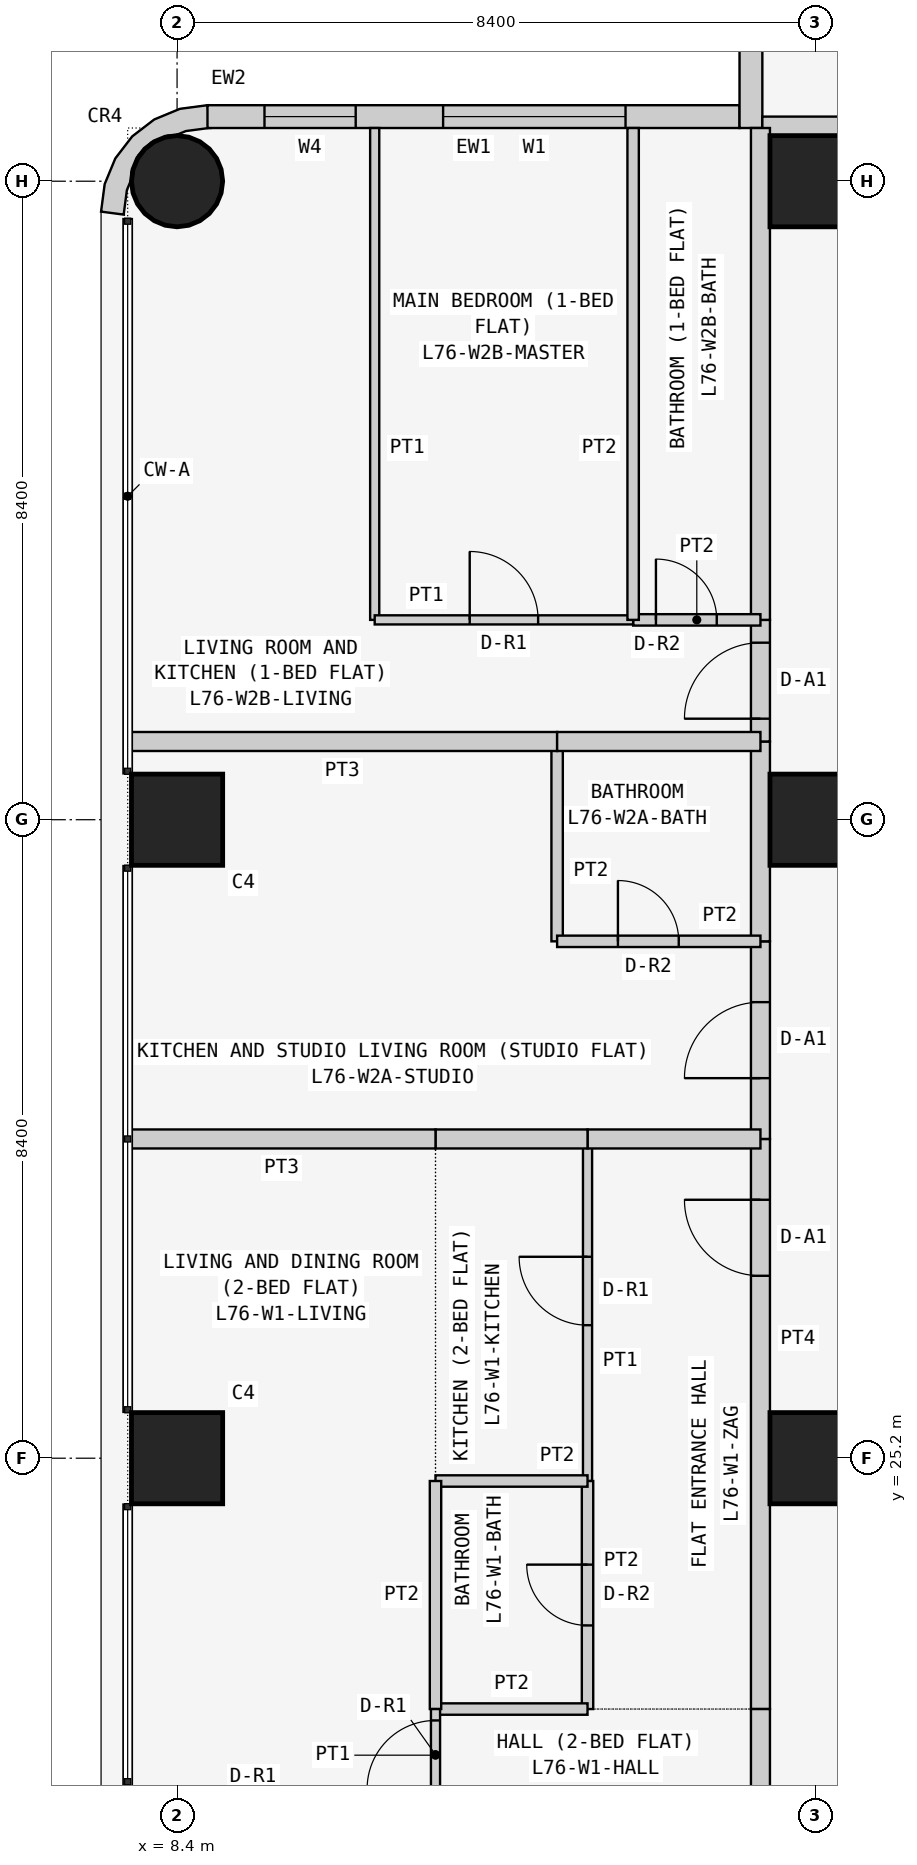
"""IFC4 building model, lengths in metres.
Left out: names, types, materials, properties, quantities, classifications, styles, units other than length and angle.
Written with IfcOpenShell. Run it as: python <this file> out.ifc"""

import sys

from ifc_helpers import new_model, si_unit, direction, frame, frame_2d, origin, origin_2d, place, context, subcontext, project, spatial, polyline, rectangle, circle, outline, extrude, element, fill, save


model = new_model("IFC4")
c1 = context("Model", 3, precision=1e-05, world=origin(), true_north=direction((0.0, 1.0)))
c2 = subcontext(c1, "Body", "Model", "MODEL_VIEW")
j1 = project(units=[si_unit("LENGTHUNIT", "METRE"), si_unit("PLANEANGLEUNIT", "RADIAN")], contexts=[c1])
p1 = place(None, origin())
s1 = spatial("IfcSite", under=j1, at=p1, CompositionType="ELEMENT")
p2 = place(p1, origin())
s2 = spatial("IfcBuilding", under=s1, at=p2, CompositionType="ELEMENT")
p3 = place(p2, frame((0.0, 0.0, 290.1)))
s3 = spatial("IfcBuildingStorey", under=s2, at=p3, CompositionType="ELEMENT", Elevation=290.1)
for number, where, z_axis, x_axis in (
    (1, (8.4, 25.2, 0.0), (0.0, 0.0, 1.0), (1.0, 0.0, 0.0)),
    (2, (8.4, 33.6, 0.0), (0.0, 0.0, 1.0), (1.0, 0.0, 0.0)),
):
    element("IfcColumn", number, at=place(p3, frame(where, z_axis=z_axis, x_axis=x_axis)), inside=s3, PredefinedType="COLUMN", context=c2, shape_type="SweptSolid", body=[
        extrude(rectangle(XDim=1.2, YDim=1.2, at=origin_2d()), origin(), (0.0, 0.0, 1.0), 3.6),
    ])
p4 = place(p3, frame((8.4, 42.0, 0.0), z_axis=(0.0, 0.0, 1.0), x_axis=(1.0, 0.0, 0.0)))
e3 = element("IfcColumn", 3, at=p4, inside=s3, PredefinedType="COLUMN", context=c2, shape_type="SweptSolid", body=[
    extrude(circle(Radius=0.6, at=origin_2d()), origin(), (0.0, 0.0, 1.0), 3.6),
])
for number, where, z_axis, x_axis in (
    (4, (16.8, 25.2, 0.0), (0.0, 0.0, 1.0), (1.0, 0.0, 0.0)),
    (5, (16.8, 33.6, 0.0), (0.0, 0.0, 1.0), (1.0, 0.0, 0.0)),
    (6, (16.8, 42.0, 0.0), (0.0, 0.0, 1.0), (1.0, 0.0, 0.0)),
):
    element("IfcColumn", number, at=place(p3, frame(where, z_axis=z_axis, x_axis=x_axis)), inside=s3, PredefinedType="COLUMN", context=c2, shape_type="SweptSolid", body=[
        extrude(rectangle(XDim=1.2, YDim=1.2, at=origin_2d()), origin(), (0.0, 0.0, 1.0), 3.6),
    ])
p5 = place(p3, frame((15.8, 42.85, 0.0), z_axis=(0.0, 0.0, 1.0), x_axis=(-1.0, 0.0, 0.0)))
e7 = element("IfcWall", 7, at=p5, inside=s3, PredefinedType="SOLIDWALL", context=c2, shape_type="SweptSolid", body=[
    extrude(rectangle(XDim=7.0, YDim=0.3, at=frame_2d((3.5, 0.0))), origin(), (0.0, 0.0, 1.0), 3.45),
])
p6 = place(p5, frame((1.5, 0.0, 0.9)))
e8 = element("IfcOpeningElement", 8, at=p6, cuts=e7, PredefinedType="OPENING", context=c2, shape_type="SweptSolid", body=[
    extrude(rectangle(XDim=2.4, YDim=1.5, at=frame_2d((1.2, 0.75))), frame((0.0, 0.16, 0.0), z_axis=(0.0, -1.0, 0.0), x_axis=(1.0, 0.0, 0.0)), (0.0, 0.0, 1.0), 0.32),
])
p7 = place(p5, frame((5.05, 0.0, 0.9)))
e9 = element("IfcOpeningElement", 9, at=p7, cuts=e7, PredefinedType="OPENING", context=c2, shape_type="SweptSolid", body=[
    extrude(rectangle(XDim=1.2, YDim=1.5, at=frame_2d((0.6, 0.75))), frame((0.0, 0.16, 0.0), z_axis=(0.0, -1.0, 0.0), x_axis=(1.0, 0.0, 0.0)), (0.0, 0.0, 1.0), 0.32),
])
p8 = place(p3, frame((15.95, 50.0, 0.0), z_axis=(0.0, 0.0, 1.0), x_axis=(0.0, -1.0, 0.0)))
e10 = element("IfcWall", 10, at=p8, inside=s3, PredefinedType="SOLIDWALL", context=c2, shape_type="SweptSolid", body=[
    extrude(rectangle(XDim=7.3, YDim=0.3, at=frame_2d((3.65, 0.0))), origin(), (0.0, 0.0, 1.0), 3.45),
])
p9 = place(p8, frame((3.1, 0.0, 0.9)))
e11 = element("IfcOpeningElement", 11, at=p9, cuts=e10, PredefinedType="OPENING", context=c2, shape_type="SweptSolid", body=[
    extrude(rectangle(XDim=2.4, YDim=1.5, at=frame_2d((1.2, 0.75))), frame((0.0, 0.16, 0.0), z_axis=(0.0, -1.0, 0.0), x_axis=(1.0, 0.0, 0.0)), (0.0, 0.0, 1.0), 0.32),
])
p10 = place(p8, frame((0.75, 0.0, 0.9)))
e12 = element("IfcOpeningElement", 12, at=p10, cuts=e10, PredefinedType="OPENING", context=c2, shape_type="SweptSolid", body=[
    extrude(rectangle(XDim=1.2, YDim=1.5, at=frame_2d((0.6, 0.75))), frame((0.0, 0.16, 0.0), z_axis=(0.0, -1.0, 0.0), x_axis=(1.0, 0.0, 0.0)), (0.0, 0.0, 1.0), 0.32),
])
p11 = place(p3, frame((8.762, 42.576, 0.0), z_axis=(0.0, 0.0, 1.0), x_axis=(-0.707106781187, 0.707106781187, 0.0)))
e13 = element("IfcWall", 13, at=p11, inside=s3, PredefinedType="SOLIDWALL", context=c2, shape_type="SweptSolid", body=[
    extrude(outline(polyline([(0.233, 0.114), (0.047, -0.129), (0.033, -0.143), (0.273, -0.327), (0.495, -0.037), (0.635, 0.3), (0.683, 0.663), (0.635, 1.025), (0.495, 1.363), (0.273, 1.653), (0.033, 1.469), (0.047, 1.455), (0.233, 1.212), (0.292, 1.069), (0.358, 1.003), (0.449, 0.783), (0.449, 0.543), (0.358, 0.322), (0.292, 0.257), (0.233, 0.114)])), origin(), (0.0, 0.0, 1.0), 3.45),
])
p12 = place(p3, frame((16.1, 42.725, 0.0), z_axis=(0.0, 0.0, 1.0), x_axis=(1.0, 0.0, 0.0)))
e14 = element("IfcWall", 14, at=p12, inside=s3, PredefinedType="PARTITIONING", context=c2, shape_type="SweptSolid", body=[
    extrude(rectangle(XDim=6.871, YDim=0.25, at=frame_2d((3.436, 0.0))), origin(), (0.0, 0.0, 1.0), 3.45),
])
p13 = place(p3, frame((16.075, 21.9, 0.0), z_axis=(0.0, 0.0, 1.0), x_axis=(0.0, 1.0, 0.0)))
e15 = element("IfcWall", 15, at=p13, inside=s3, PredefinedType="PARTITIONING", context=c2, shape_type="SweptSolid", body=[
    extrude(rectangle(XDim=7.5, YDim=0.25, at=frame_2d((3.75, 0.0))), origin(), (0.0, 0.0, 1.0), 3.45),
])
p14 = place(p13, frame((5.7, 0.0, 0.0)))
e16 = element("IfcOpeningElement", 16, at=p14, cuts=e15, PredefinedType="OPENING", context=c2, shape_type="SweptSolid", body=[
    extrude(rectangle(XDim=1.0, YDim=2.1, at=frame_2d((0.5, 1.05))), frame((0.0, 0.135, 0.0), z_axis=(0.0, -1.0, 0.0), x_axis=(1.0, 0.0, 0.0)), (0.0, 0.0, 1.0), 0.27),
])
p15 = place(p3, frame((16.075, 20.686, 0.0), z_axis=(0.0, 0.0, 1.0), x_axis=(0.0, 1.0, 0.0)))
e17 = element("IfcWall", 17, at=p15, inside=s3, PredefinedType="PARTITIONING", context=c2, shape_type="SweptSolid", body=[
    extrude(rectangle(XDim=1.214, YDim=0.25, at=frame_2d((0.607, 0.0))), origin(), (0.0, 0.0, 1.0), 3.45),
])
p16 = place(p3, frame((16.075, 29.4, 0.0), z_axis=(0.0, 0.0, 1.0), x_axis=(0.0, 1.0, 0.0)))
e18 = element("IfcWall", 18, at=p16, inside=s3, PredefinedType="PARTITIONING", context=c2, shape_type="SweptSolid", body=[
    extrude(rectangle(XDim=2.6, YDim=0.25, at=frame_2d((1.3, 0.0))), origin(), (0.0, 0.0, 1.0), 3.45),
])
p17 = place(p16, frame((0.8, 0.0, 0.0)))
e19 = element("IfcOpeningElement", 19, at=p17, cuts=e18, PredefinedType="OPENING", context=c2, shape_type="SweptSolid", body=[
    extrude(rectangle(XDim=1.0, YDim=2.1, at=frame_2d((0.5, 1.05))), frame((0.0, 0.135, 0.0), z_axis=(0.0, -1.0, 0.0), x_axis=(1.0, 0.0, 0.0)), (0.0, 0.0, 1.0), 0.27),
])
p18 = place(p3, frame((16.075, 32.0, 0.0), z_axis=(0.0, 0.0, 1.0), x_axis=(0.0, 1.0, 0.0)))
e20 = element("IfcWall", 20, at=p18, inside=s3, PredefinedType="PARTITIONING", context=c2, shape_type="SweptSolid", body=[
    extrude(rectangle(XDim=2.629, YDim=0.25, at=frame_2d((1.314, 0.0))), origin(), (0.0, 0.0, 1.0), 3.45),
])
p19 = place(p3, frame((16.075, 34.629, 0.0), z_axis=(0.0, 0.0, 1.0), x_axis=(0.0, 1.0, 0.0)))
e21 = element("IfcWall", 21, at=p19, inside=s3, PredefinedType="PARTITIONING", context=c2, shape_type="SweptSolid", body=[
    extrude(rectangle(XDim=1.6, YDim=0.25, at=frame_2d((0.8, 0.0))), origin(), (0.0, 0.0, 1.0), 3.45),
])
p20 = place(p19, frame((0.3, 0.0, 0.0)))
e22 = element("IfcOpeningElement", 22, at=p20, cuts=e21, PredefinedType="OPENING", context=c2, shape_type="SweptSolid", body=[
    extrude(rectangle(XDim=1.0, YDim=2.1, at=frame_2d((0.5, 1.05))), frame((0.0, 0.135, 0.0), z_axis=(0.0, -1.0, 0.0), x_axis=(1.0, 0.0, 0.0)), (0.0, 0.0, 1.0), 0.27),
])
p21 = place(p3, frame((16.075, 36.229, 0.0), z_axis=(0.0, 0.0, 1.0), x_axis=(0.0, 1.0, 0.0)))
e23 = element("IfcWall", 23, at=p21, inside=s3, PredefinedType="PARTITIONING", context=c2, shape_type="SweptSolid", body=[
    extrude(rectangle(XDim=6.471, YDim=0.25, at=frame_2d((3.235, 0.0))), origin(), (0.0, 0.0, 1.0), 3.45),
])
p22 = place(p3, frame((13.8, 29.4, 0.0), z_axis=(0.0, 0.0, 1.0), x_axis=(0.0, -1.0, 0.0)))
e24 = element("IfcWall", 24, at=p22, inside=s3, PredefinedType="PARTITIONING", context=c2, shape_type="SweptSolid", body=[
    extrude(rectangle(XDim=4.5, YDim=0.12, at=frame_2d((2.25, 0.0))), origin(), (0.0, 0.0, 1.0), 3.45),
])
p23 = place(p22, frame((1.55, 0.0, 0.0)))
e25 = element("IfcOpeningElement", 25, at=p23, cuts=e24, PredefinedType="OPENING", context=c2, shape_type="SweptSolid", body=[
    extrude(rectangle(XDim=0.9, YDim=2.1, at=frame_2d((0.45, 1.05))), frame((0.0, 0.07, 0.0), z_axis=(0.0, -1.0, 0.0), x_axis=(1.0, 0.0, 0.0)), (0.0, 0.0, 1.0), 0.14),
])
p24 = place(p3, frame((13.8, 24.9, 0.0), z_axis=(0.0, 0.0, 1.0), x_axis=(0.0, -1.0, 0.0)))
e26 = element("IfcWall", 26, at=p24, inside=s3, PredefinedType="PARTITIONING", context=c2, shape_type="SweptSolid", body=[
    extrude(rectangle(XDim=3.0, YDim=0.15, at=frame_2d((1.5, 0.0))), origin(), (0.0, 0.0, 1.0), 3.45),
])
p25 = place(p24, frame((1.1, 0.0, 0.0)))
e27 = element("IfcOpeningElement", 27, at=p25, cuts=e26, PredefinedType="OPENING", context=c2, shape_type="SweptSolid", body=[
    extrude(rectangle(XDim=0.8, YDim=2.1, at=frame_2d((0.4, 1.05))), frame((0.0, 0.085, 0.0), z_axis=(0.0, -1.0, 0.0), x_axis=(1.0, 0.0, 0.0)), (0.0, 0.0, 1.0), 0.17),
])
p26 = place(p3, frame((16.075, 29.4, 0.0), z_axis=(0.0, 0.0, 1.0), x_axis=(-1.0, 0.0, 0.0)))
e28 = element("IfcWall", 28, at=p26, inside=s3, PredefinedType="PARTITIONING", context=c2, shape_type="SweptSolid", body=[
    extrude(rectangle(XDim=2.275, YDim=0.25, at=frame_2d((1.137, 0.0))), origin(), (0.0, 0.0, 1.0), 3.45),
])
p27 = place(p3, frame((11.8, 24.9, 0.0), z_axis=(0.0, 0.0, 1.0), x_axis=(1.0, 0.0, 0.0)))
e29 = element("IfcWall", 29, at=p27, inside=s3, PredefinedType="PARTITIONING", context=c2, shape_type="SweptSolid", body=[
    extrude(rectangle(XDim=2.0, YDim=0.15, at=frame_2d((1.0, 0.0))), origin(), (0.0, 0.0, 1.0), 3.45),
])
p28 = place(p3, frame((13.8, 29.4, 0.0), z_axis=(0.0, 0.0, 1.0), x_axis=(-1.0, 0.0, 0.0)))
e30 = element("IfcWall", 30, at=p28, inside=s3, PredefinedType="PARTITIONING", context=c2, shape_type="SweptSolid", body=[
    extrude(rectangle(XDim=2.0, YDim=0.25, at=frame_2d((1.0, 0.0))), origin(), (0.0, 0.0, 1.0), 3.45),
])
p29 = place(p3, frame((11.8, 21.9, 0.0), z_axis=(0.0, 0.0, 1.0), x_axis=(1.0, 0.0, 0.0)))
e31 = element("IfcWall", 31, at=p29, inside=s3, PredefinedType="PARTITIONING", context=c2, shape_type="SweptSolid", body=[
    extrude(rectangle(XDim=2.0, YDim=0.15, at=frame_2d((1.0, 0.0))), origin(), (0.0, 0.0, 1.0), 3.45),
])
p30 = place(p3, frame((11.8, 24.9, 0.0), z_axis=(0.0, 0.0, 1.0), x_axis=(0.0, -1.0, 0.0)))
e32 = element("IfcWall", 32, at=p30, inside=s3, PredefinedType="PARTITIONING", context=c2, shape_type="SweptSolid", body=[
    extrude(rectangle(XDim=3.0, YDim=0.15, at=frame_2d((1.5, 0.0))), origin(), (0.0, 0.0, 1.0), 3.45),
])
p31 = place(p3, frame((11.8, 21.9, 0.0), z_axis=(0.0, 0.0, 1.0), x_axis=(0.0, -1.0, 0.0)))
e33 = element("IfcWall", 33, at=p31, inside=s3, PredefinedType="PARTITIONING", context=c2, shape_type="SweptSolid", body=[
    extrude(rectangle(XDim=1.214, YDim=0.12, at=frame_2d((0.607, 0.0))), origin(), (0.0, 0.0, 1.0), 3.45),
])
p32 = place(p31, frame((0.15, 0.0, 0.0)))
e34 = element("IfcOpeningElement", 34, at=p32, cuts=e33, PredefinedType="OPENING", context=c2, shape_type="SweptSolid", body=[
    extrude(rectangle(XDim=0.9, YDim=2.1, at=frame_2d((0.45, 1.05))), frame((0.0, 0.07, 0.0), z_axis=(0.0, -1.0, 0.0), x_axis=(1.0, 0.0, 0.0)), (0.0, 0.0, 1.0), 0.14),
])
p33 = place(p3, frame((11.8, 29.4, 0.0), z_axis=(0.0, 0.0, 1.0), x_axis=(-1.0, 0.0, 0.0)))
e35 = element("IfcWall", 35, at=p33, inside=s3, PredefinedType="PARTITIONING", context=c2, shape_type="SweptSolid", body=[
    extrude(rectangle(XDim=4.05, YDim=0.25, at=frame_2d((2.025, 0.0))), origin(), (0.0, 0.0, 1.0), 3.45),
])
p34 = place(p3, frame((13.4, 34.629, 0.0), z_axis=(0.0, 0.0, 1.0), x_axis=(0.0, -1.0, 0.0)))
e36 = element("IfcWall", 36, at=p34, inside=s3, PredefinedType="PARTITIONING", context=c2, shape_type="SweptSolid", body=[
    extrude(rectangle(XDim=2.629, YDim=0.15, at=frame_2d((1.314, 0.0))), origin(), (0.0, 0.0, 1.0), 3.45),
])
p35 = place(p3, frame((13.4, 32.0, 0.0), z_axis=(0.0, 0.0, 1.0), x_axis=(1.0, 0.0, 0.0)))
e37 = element("IfcWall", 37, at=p35, inside=s3, PredefinedType="PARTITIONING", context=c2, shape_type="SweptSolid", body=[
    extrude(rectangle(XDim=2.675, YDim=0.15, at=frame_2d((1.337, 0.0))), origin(), (0.0, 0.0, 1.0), 3.45),
])
p36 = place(p35, frame((0.8, 0.0, 0.0)))
e38 = element("IfcOpeningElement", 38, at=p36, cuts=e37, PredefinedType="OPENING", context=c2, shape_type="SweptSolid", body=[
    extrude(rectangle(XDim=0.8, YDim=2.1, at=frame_2d((0.4, 1.05))), frame((0.0, 0.085, 0.0), z_axis=(0.0, -1.0, 0.0), x_axis=(1.0, 0.0, 0.0)), (0.0, 0.0, 1.0), 0.17),
])
p37 = place(p3, frame((7.75, 34.629, 0.0), z_axis=(0.0, 0.0, 1.0), x_axis=(1.0, 0.0, 0.0)))
e39 = element("IfcWall", 39, at=p37, inside=s3, PredefinedType="PARTITIONING", context=c2, shape_type="SweptSolid", body=[
    extrude(rectangle(XDim=5.65, YDim=0.25, at=frame_2d((2.825, 0.0))), origin(), (0.0, 0.0, 1.0), 3.45),
])
p38 = place(p3, frame((13.4, 34.629, 0.0), z_axis=(0.0, 0.0, 1.0), x_axis=(1.0, 0.0, 0.0)))
e40 = element("IfcWall", 40, at=p38, inside=s3, PredefinedType="PARTITIONING", context=c2, shape_type="SweptSolid", body=[
    extrude(rectangle(XDim=2.675, YDim=0.25, at=frame_2d((1.337, 0.0))), origin(), (0.0, 0.0, 1.0), 3.45),
])
p39 = place(p3, frame((14.4, 36.229, 0.0), z_axis=(0.0, 0.0, 1.0), x_axis=(1.0, 0.0, 0.0)))
e41 = element("IfcWall", 41, at=p39, inside=s3, PredefinedType="PARTITIONING", context=c2, shape_type="SweptSolid", body=[
    extrude(rectangle(XDim=1.675, YDim=0.15, at=frame_2d((0.837, 0.0))), origin(), (0.0, 0.0, 1.0), 3.45),
])
p40 = place(p39, frame((0.3, 0.0, 0.0)))
e42 = element("IfcOpeningElement", 42, at=p40, cuts=e41, PredefinedType="OPENING", context=c2, shape_type="SweptSolid", body=[
    extrude(rectangle(XDim=0.8, YDim=2.1, at=frame_2d((0.4, 1.05))), frame((0.0, 0.085, 0.0), z_axis=(0.0, -1.0, 0.0), x_axis=(1.0, 0.0, 0.0)), (0.0, 0.0, 1.0), 0.17),
])
p41 = place(p3, frame((11.0, 42.7, 0.0), z_axis=(0.0, 0.0, 1.0), x_axis=(0.0, -1.0, 0.0)))
e43 = element("IfcWall", 43, at=p41, inside=s3, PredefinedType="PARTITIONING", context=c2, shape_type="SweptSolid", body=[
    extrude(rectangle(XDim=6.471, YDim=0.12, at=frame_2d((3.235, 0.0))), origin(), (0.0, 0.0, 1.0), 3.45),
])
p42 = place(p3, frame((11.0, 36.229, 0.0), z_axis=(0.0, 0.0, 1.0), x_axis=(1.0, 0.0, 0.0)))
e44 = element("IfcWall", 44, at=p42, inside=s3, PredefinedType="PARTITIONING", context=c2, shape_type="SweptSolid", body=[
    extrude(rectangle(XDim=3.4, YDim=0.12, at=frame_2d((1.7, 0.0))), origin(), (0.0, 0.0, 1.0), 3.45),
])
p43 = place(p42, frame((1.25, 0.0, 0.0)))
e45 = element("IfcOpeningElement", 45, at=p43, cuts=e44, PredefinedType="OPENING", context=c2, shape_type="SweptSolid", body=[
    extrude(rectangle(XDim=0.9, YDim=2.1, at=frame_2d((0.45, 1.05))), frame((0.0, 0.07, 0.0), z_axis=(0.0, -1.0, 0.0), x_axis=(1.0, 0.0, 0.0)), (0.0, 0.0, 1.0), 0.14),
])
p44 = place(p3, frame((14.4, 36.229, 0.0), z_axis=(0.0, 0.0, 1.0), x_axis=(0.0, 1.0, 0.0)))
e46 = element("IfcWall", 46, at=p44, inside=s3, PredefinedType="PARTITIONING", context=c2, shape_type="SweptSolid", body=[
    extrude(rectangle(XDim=6.471, YDim=0.15, at=frame_2d((3.235, 0.0))), origin(), (0.0, 0.0, 1.0), 3.45),
])
p45 = place(p6, origin())
e47 = element("IfcWindow", 47, at=p45, inside=s3, PartitioningType="SINGLE_PANEL", PredefinedType="WINDOW", context=c2, shape_type="SweptSolid", body=[
    extrude(rectangle(XDim=2.4, YDim=1.5, at=frame_2d((1.2, 0.75))), frame((0.0, 0.03, 0.0), z_axis=(0.0, -1.0, 0.0), x_axis=(1.0, 0.0, 0.0)), (0.0, 0.0, 1.0), 0.06),
])
fill(e8, e47)
p46 = place(p7, origin())
e48 = element("IfcWindow", 48, at=p46, inside=s3, PartitioningType="SINGLE_PANEL", PredefinedType="WINDOW", context=c2, shape_type="SweptSolid", body=[
    extrude(rectangle(XDim=1.2, YDim=1.5, at=frame_2d((0.6, 0.75))), frame((0.0, 0.03, 0.0), z_axis=(0.0, -1.0, 0.0), x_axis=(1.0, 0.0, 0.0)), (0.0, 0.0, 1.0), 0.06),
])
fill(e9, e48)
p47 = place(p14, origin())
e49 = element("IfcDoor", 49, at=p47, inside=s3, OperationType="SINGLE_SWING_RIGHT", PredefinedType="DOOR", context=c2, shape_type="SweptSolid", body=[
    extrude(rectangle(XDim=1.0, YDim=2.1, at=frame_2d((0.5, 1.05))), frame((0.0, 0.025, 0.0), z_axis=(0.0, -1.0, 0.0), x_axis=(1.0, 0.0, 0.0)), (0.0, 0.0, 1.0), 0.05),
])
fill(e16, e49)
p48 = place(p23, frame((0.9, 0.0, 0.0), z_axis=(0.0, 0.0, 1.0), x_axis=(-1.0, 0.0, 0.0)))
e50 = element("IfcDoor", 50, at=p48, inside=s3, OperationType="SINGLE_SWING_RIGHT", PredefinedType="DOOR", context=c2, shape_type="SweptSolid", body=[
    extrude(rectangle(XDim=0.9, YDim=2.1, at=frame_2d((0.45, 1.05))), frame((0.0, 0.025, 0.0), z_axis=(0.0, -1.0, 0.0), x_axis=(1.0, 0.0, 0.0)), (0.0, 0.0, 1.0), 0.05),
])
fill(e25, e50)
p49 = place(p25, frame((0.8, 0.0, 0.0), z_axis=(0.0, 0.0, 1.0), x_axis=(-1.0, 0.0, 0.0)))
e51 = element("IfcDoor", 51, at=p49, inside=s3, OperationType="SINGLE_SWING_RIGHT", PredefinedType="DOOR", context=c2, shape_type="SweptSolid", body=[
    extrude(rectangle(XDim=0.8, YDim=2.1, at=frame_2d((0.4, 1.05))), frame((0.0, 0.025, 0.0), z_axis=(0.0, -1.0, 0.0), x_axis=(1.0, 0.0, 0.0)), (0.0, 0.0, 1.0), 0.05),
])
fill(e27, e51)
p50 = place(p32, frame((0.9, 0.0, 0.0), z_axis=(0.0, 0.0, 1.0), x_axis=(-1.0, 0.0, 0.0)))
e52 = element("IfcDoor", 52, at=p50, inside=s3, OperationType="SINGLE_SWING_LEFT", PredefinedType="DOOR", context=c2, shape_type="SweptSolid", body=[
    extrude(rectangle(XDim=0.9, YDim=2.1, at=frame_2d((0.45, 1.05))), frame((0.0, 0.025, 0.0), z_axis=(0.0, -1.0, 0.0), x_axis=(1.0, 0.0, 0.0)), (0.0, 0.0, 1.0), 0.05),
])
fill(e34, e52)
p51 = place(p17, origin())
e53 = element("IfcDoor", 53, at=p51, inside=s3, OperationType="SINGLE_SWING_LEFT", PredefinedType="DOOR", context=c2, shape_type="SweptSolid", body=[
    extrude(rectangle(XDim=1.0, YDim=2.1, at=frame_2d((0.5, 1.05))), frame((0.0, 0.025, 0.0), z_axis=(0.0, -1.0, 0.0), x_axis=(1.0, 0.0, 0.0)), (0.0, 0.0, 1.0), 0.05),
])
fill(e19, e53)
p52 = place(p36, origin())
e54 = element("IfcDoor", 54, at=p52, inside=s3, OperationType="SINGLE_SWING_LEFT", PredefinedType="DOOR", context=c2, shape_type="SweptSolid", body=[
    extrude(rectangle(XDim=0.8, YDim=2.1, at=frame_2d((0.4, 1.05))), frame((0.0, 0.025, 0.0), z_axis=(0.0, -1.0, 0.0), x_axis=(1.0, 0.0, 0.0)), (0.0, 0.0, 1.0), 0.05),
])
fill(e38, e54)
p53 = place(p20, origin())
e55 = element("IfcDoor", 55, at=p53, inside=s3, OperationType="SINGLE_SWING_LEFT", PredefinedType="DOOR", context=c2, shape_type="SweptSolid", body=[
    extrude(rectangle(XDim=1.0, YDim=2.1, at=frame_2d((0.5, 1.05))), frame((0.0, 0.025, 0.0), z_axis=(0.0, -1.0, 0.0), x_axis=(1.0, 0.0, 0.0)), (0.0, 0.0, 1.0), 0.05),
])
fill(e22, e55)
p54 = place(p40, origin())
e56 = element("IfcDoor", 56, at=p54, inside=s3, OperationType="SINGLE_SWING_LEFT", PredefinedType="DOOR", context=c2, shape_type="SweptSolid", body=[
    extrude(rectangle(XDim=0.8, YDim=2.1, at=frame_2d((0.4, 1.05))), frame((0.0, 0.025, 0.0), z_axis=(0.0, -1.0, 0.0), x_axis=(1.0, 0.0, 0.0)), (0.0, 0.0, 1.0), 0.05),
])
fill(e42, e56)
p55 = place(p43, origin())
e57 = element("IfcDoor", 57, at=p55, inside=s3, OperationType="SINGLE_SWING_LEFT", PredefinedType="DOOR", context=c2, shape_type="SweptSolid", body=[
    extrude(rectangle(XDim=0.9, YDim=2.1, at=frame_2d((0.45, 1.05))), frame((0.0, 0.025, 0.0), z_axis=(0.0, -1.0, 0.0), x_axis=(1.0, 0.0, 0.0)), (0.0, 0.0, 1.0), 0.05),
])
fill(e45, e57)
save(model, sys.argv[1])
